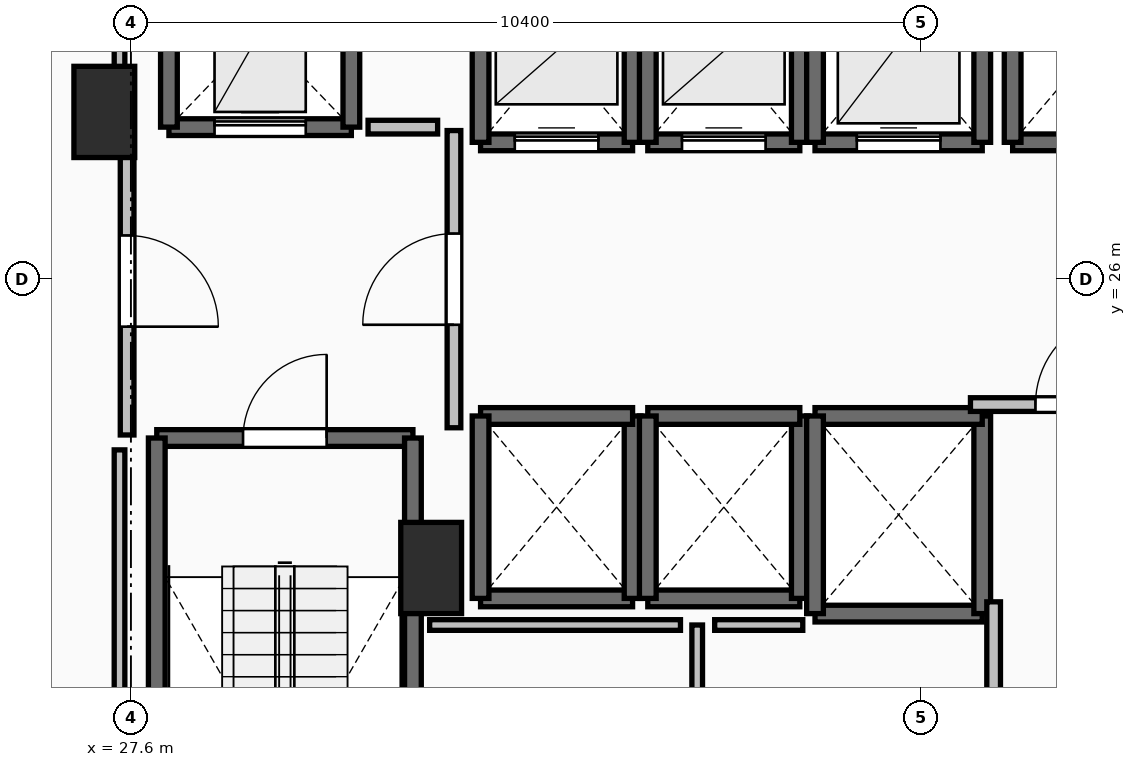
"""IFC4 building model, lengths in metres.
Left out: names, types, materials, properties, quantities, classifications, styles, units other than length and angle.
Written with IfcOpenShell. Run it as: python <this file> out.ifc"""

import sys

from ifc_helpers import new_model, si_unit, direction, frame, frame_2d, origin, origin_2d, place, context, subcontext, project, spatial, rectangle, extrude, element, fill, save


model = new_model("IFC4")
c1 = context("Model", 3, precision=1e-05, world=origin(), true_north=direction((0.0, 1.0)))
c2 = subcontext(c1, "Body", "Model", "MODEL_VIEW")
j1 = project(units=[si_unit("LENGTHUNIT", "METRE"), si_unit("PLANEANGLEUNIT", "RADIAN")], contexts=[c1])
p1 = place(None, origin())
s1 = spatial("IfcSite", under=j1, at=p1, CompositionType="ELEMENT")
p2 = place(p1, origin())
s2 = spatial("IfcBuilding", under=s1, at=p2, CompositionType="ELEMENT")
p3 = place(p2, frame((0.0, 0.0, 85.8)))
s3 = spatial("IfcBuildingStorey", under=s2, at=p3, CompositionType="ELEMENT", Elevation=85.8)
for number, where, z_axis, x_axis in (
    (1, (27.25, 28.2, 0.0), (0.0, 0.0, 1.0), (1.0, 0.0, 0.0)),
    (2, (31.55, 22.2, 0.0), (0.0, 0.0, 1.0), (1.0, 0.0, 0.0)),
):
    element("IfcColumn", number, at=place(p3, frame(where, z_axis=z_axis, x_axis=x_axis)), inside=s3, PredefinedType="PILASTER", context=c2, shape_type="SweptSolid", body=[
        extrude(rectangle(XDim=0.8, YDim=1.2, at=origin_2d()), origin(), (0.0, 0.0, 1.0), 3.5),
    ])
p4 = place(p3, frame((27.94, 23.91, 0.0), z_axis=(0.0, 0.0, 1.0), x_axis=(1.0, 0.0, 0.0)))
e3 = element("IfcWall", 3, at=p4, inside=s3, PredefinedType="SOLIDWALL", context=c2, shape_type="SweptSolid", body=[
    extrude(rectangle(XDim=3.37, YDim=0.22, at=frame_2d((1.685, 0.0))), origin(), (0.0, 0.0, 1.0), 3.24),
])
p5 = place(p4, frame((1.135, 0.0, 0.0)))
e4 = element("IfcOpeningElement", 4, at=p5, cuts=e3, PredefinedType="OPENING", context=c2, shape_type="SweptSolid", body=[
    extrude(rectangle(XDim=1.1, YDim=2.15, at=frame_2d((0.55, 1.075))), frame((0.0, 0.125, 0.0), z_axis=(0.0, -1.0, 0.0), x_axis=(1.0, 0.0, 0.0)), (0.0, 0.0, 1.0), 0.25),
])
for number, where, z_axis, x_axis in (
    (5, (31.31, 23.91, 0.0), (0.0, 0.0, 1.0), (0.0, -1.0, 0.0)),
    (6, (27.94, 16.49, 0.0), (0.0, 0.0, 1.0), (0.0, 1.0, 0.0)),
):
    element("IfcWall", number, at=place(p3, frame(where, z_axis=z_axis, x_axis=x_axis)), inside=s3, PredefinedType="SOLIDWALL", context=c2, shape_type="SweptSolid", body=[
        extrude(rectangle(XDim=7.42, YDim=0.22, at=frame_2d((3.71, 0.0))), origin(), (0.0, 0.0, 1.0), 3.24),
    ])
p6 = place(p3, frame((32.2, 27.8, 0.0), z_axis=(0.0, 0.0, 1.0), x_axis=(1.0, 0.0, 0.0)))
e7 = element("IfcWall", 7, at=p6, inside=s3, PredefinedType="SOLIDWALL", context=c2, shape_type="SweptSolid", body=[
    extrude(rectangle(XDim=2.0, YDim=0.22, at=frame_2d((1.0, 0.0))), origin(), (0.0, 0.0, 1.0), 3.24),
])
p7 = place(p6, frame((0.45, 0.0, 0.0)))
e8 = element("IfcOpeningElement", 8, at=p7, cuts=e7, PredefinedType="OPENING", context=c2, shape_type="SweptSolid", body=[
    extrude(rectangle(XDim=1.1, YDim=2.2, at=frame_2d((0.55, 1.1))), frame((0.0, 0.125, 0.0), z_axis=(0.0, -1.0, 0.0), x_axis=(1.0, 0.0, 0.0)), (0.0, 0.0, 1.0), 0.25),
])
for number, where, z_axis, x_axis in (
    (9, (34.2, 27.8, 0.0), (0.0, 0.0, 1.0), (0.0, 1.0, 0.0)),
    (10, (32.2, 30.2, 0.0), (0.0, 0.0, 1.0), (0.0, -1.0, 0.0)),
):
    element("IfcWall", number, at=place(p3, frame(where, z_axis=z_axis, x_axis=x_axis)), inside=s3, PredefinedType="SOLIDWALL", context=c2, shape_type="SweptSolid", body=[
        extrude(rectangle(XDim=2.4, YDim=0.22, at=frame_2d((1.2, 0.0))), origin(), (0.0, 0.0, 1.0), 3.24),
    ])
p8 = place(p3, frame((34.4, 27.8, 0.0), z_axis=(0.0, 0.0, 1.0), x_axis=(1.0, 0.0, 0.0)))
e11 = element("IfcWall", 11, at=p8, inside=s3, PredefinedType="SOLIDWALL", context=c2, shape_type="SweptSolid", body=[
    extrude(rectangle(XDim=2.0, YDim=0.22, at=frame_2d((1.0, 0.0))), origin(), (0.0, 0.0, 1.0), 3.24),
])
p9 = place(p8, frame((0.45, 0.0, 0.0)))
e12 = element("IfcOpeningElement", 12, at=p9, cuts=e11, PredefinedType="OPENING", context=c2, shape_type="SweptSolid", body=[
    extrude(rectangle(XDim=1.1, YDim=2.2, at=frame_2d((0.55, 1.1))), frame((0.0, 0.125, 0.0), z_axis=(0.0, -1.0, 0.0), x_axis=(1.0, 0.0, 0.0)), (0.0, 0.0, 1.0), 0.25),
])
for number, where, z_axis, x_axis in (
    (13, (36.4, 27.8, 0.0), (0.0, 0.0, 1.0), (0.0, 1.0, 0.0)),
    (14, (34.4, 30.2, 0.0), (0.0, 0.0, 1.0), (0.0, -1.0, 0.0)),
):
    element("IfcWall", number, at=place(p3, frame(where, z_axis=z_axis, x_axis=x_axis)), inside=s3, PredefinedType="SOLIDWALL", context=c2, shape_type="SweptSolid", body=[
        extrude(rectangle(XDim=2.4, YDim=0.22, at=frame_2d((1.2, 0.0))), origin(), (0.0, 0.0, 1.0), 3.24),
    ])
p10 = place(p3, frame((36.6, 27.8, 0.0), z_axis=(0.0, 0.0, 1.0), x_axis=(1.0, 0.0, 0.0)))
e15 = element("IfcWall", 15, at=p10, inside=s3, PredefinedType="SOLIDWALL", context=c2, shape_type="SweptSolid", body=[
    extrude(rectangle(XDim=2.2, YDim=0.22, at=frame_2d((1.1, 0.0))), origin(), (0.0, 0.0, 1.0), 3.24),
])
p11 = place(p10, frame((0.55, 0.0, 0.0)))
e16 = element("IfcOpeningElement", 16, at=p11, cuts=e15, PredefinedType="OPENING", context=c2, shape_type="SweptSolid", body=[
    extrude(rectangle(XDim=1.1, YDim=2.2, at=frame_2d((0.55, 1.1))), frame((0.0, 0.125, 0.0), z_axis=(0.0, -1.0, 0.0), x_axis=(1.0, 0.0, 0.0)), (0.0, 0.0, 1.0), 0.25),
])
for number, where, z_axis, x_axis in (
    (17, (38.8, 27.8, 0.0), (0.0, 0.0, 1.0), (0.0, 1.0, 0.0)),
    (18, (36.6, 30.4, 0.0), (0.0, 0.0, 1.0), (0.0, -1.0, 0.0)),
):
    element("IfcWall", number, at=place(p3, frame(where, z_axis=z_axis, x_axis=x_axis)), inside=s3, PredefinedType="SOLIDWALL", context=c2, shape_type="SweptSolid", body=[
        extrude(rectangle(XDim=2.6, YDim=0.22, at=frame_2d((1.3, 0.0))), origin(), (0.0, 0.0, 1.0), 3.24),
    ])
p12 = place(p3, frame((32.2, 21.8, 0.0), z_axis=(0.0, 0.0, 1.0), x_axis=(1.0, 0.0, 0.0)))
e19 = element("IfcWall", 19, at=p12, inside=s3, PredefinedType="SOLIDWALL", context=c2, shape_type="SweptSolid", body=[
    extrude(rectangle(XDim=2.0, YDim=0.22, at=frame_2d((1.0, 0.0))), origin(), (0.0, 0.0, 1.0), 3.24),
])
p13 = place(p3, frame((34.2, 21.8, 0.0), z_axis=(0.0, 0.0, 1.0), x_axis=(0.0, 1.0, 0.0)))
e20 = element("IfcWall", 20, at=p13, inside=s3, PredefinedType="SOLIDWALL", context=c2, shape_type="SweptSolid", body=[
    extrude(rectangle(XDim=2.4, YDim=0.22, at=frame_2d((1.2, 0.0))), origin(), (0.0, 0.0, 1.0), 3.24),
])
p14 = place(p3, frame((34.2, 24.2, 0.0), z_axis=(0.0, 0.0, 1.0), x_axis=(-1.0, 0.0, 0.0)))
e21 = element("IfcWall", 21, at=p14, inside=s3, PredefinedType="SOLIDWALL", context=c2, shape_type="SweptSolid", body=[
    extrude(rectangle(XDim=2.0, YDim=0.22, at=frame_2d((1.0, 0.0))), origin(), (0.0, 0.0, 1.0), 3.24),
])
p15 = place(p3, frame((32.2, 24.2, 0.0), z_axis=(0.0, 0.0, 1.0), x_axis=(0.0, -1.0, 0.0)))
e22 = element("IfcWall", 22, at=p15, inside=s3, PredefinedType="SOLIDWALL", context=c2, shape_type="SweptSolid", body=[
    extrude(rectangle(XDim=2.4, YDim=0.22, at=frame_2d((1.2, 0.0))), origin(), (0.0, 0.0, 1.0), 3.24),
])
p16 = place(p3, frame((34.4, 21.8, 0.0), z_axis=(0.0, 0.0, 1.0), x_axis=(1.0, 0.0, 0.0)))
e23 = element("IfcWall", 23, at=p16, inside=s3, PredefinedType="SOLIDWALL", context=c2, shape_type="SweptSolid", body=[
    extrude(rectangle(XDim=2.0, YDim=0.22, at=frame_2d((1.0, 0.0))), origin(), (0.0, 0.0, 1.0), 3.24),
])
p17 = place(p3, frame((36.4, 21.8, 0.0), z_axis=(0.0, 0.0, 1.0), x_axis=(0.0, 1.0, 0.0)))
e24 = element("IfcWall", 24, at=p17, inside=s3, PredefinedType="SOLIDWALL", context=c2, shape_type="SweptSolid", body=[
    extrude(rectangle(XDim=2.4, YDim=0.22, at=frame_2d((1.2, 0.0))), origin(), (0.0, 0.0, 1.0), 3.24),
])
p18 = place(p3, frame((36.4, 24.2, 0.0), z_axis=(0.0, 0.0, 1.0), x_axis=(-1.0, 0.0, 0.0)))
e25 = element("IfcWall", 25, at=p18, inside=s3, PredefinedType="SOLIDWALL", context=c2, shape_type="SweptSolid", body=[
    extrude(rectangle(XDim=2.0, YDim=0.22, at=frame_2d((1.0, 0.0))), origin(), (0.0, 0.0, 1.0), 3.24),
])
p19 = place(p3, frame((34.4, 24.2, 0.0), z_axis=(0.0, 0.0, 1.0), x_axis=(0.0, -1.0, 0.0)))
e26 = element("IfcWall", 26, at=p19, inside=s3, PredefinedType="SOLIDWALL", context=c2, shape_type="SweptSolid", body=[
    extrude(rectangle(XDim=2.4, YDim=0.22, at=frame_2d((1.2, 0.0))), origin(), (0.0, 0.0, 1.0), 3.24),
])
p20 = place(p3, frame((36.6, 21.6, 0.0), z_axis=(0.0, 0.0, 1.0), x_axis=(1.0, 0.0, 0.0)))
e27 = element("IfcWall", 27, at=p20, inside=s3, PredefinedType="SOLIDWALL", context=c2, shape_type="SweptSolid", body=[
    extrude(rectangle(XDim=2.2, YDim=0.22, at=frame_2d((1.1, 0.0))), origin(), (0.0, 0.0, 1.0), 3.24),
])
p21 = place(p3, frame((38.8, 21.6, 0.0), z_axis=(0.0, 0.0, 1.0), x_axis=(0.0, 1.0, 0.0)))
e28 = element("IfcWall", 28, at=p21, inside=s3, PredefinedType="SOLIDWALL", context=c2, shape_type="SweptSolid", body=[
    extrude(rectangle(XDim=2.6, YDim=0.22, at=frame_2d((1.3, 0.0))), origin(), (0.0, 0.0, 1.0), 3.24),
])
p22 = place(p3, frame((38.8, 24.2, 0.0), z_axis=(0.0, 0.0, 1.0), x_axis=(-1.0, 0.0, 0.0)))
e29 = element("IfcWall", 29, at=p22, inside=s3, PredefinedType="SOLIDWALL", context=c2, shape_type="SweptSolid", body=[
    extrude(rectangle(XDim=2.2, YDim=0.22, at=frame_2d((1.1, 0.0))), origin(), (0.0, 0.0, 1.0), 3.24),
])
p23 = place(p3, frame((36.6, 24.2, 0.0), z_axis=(0.0, 0.0, 1.0), x_axis=(0.0, -1.0, 0.0)))
e30 = element("IfcWall", 30, at=p23, inside=s3, PredefinedType="SOLIDWALL", context=c2, shape_type="SweptSolid", body=[
    extrude(rectangle(XDim=2.6, YDim=0.22, at=frame_2d((1.3, 0.0))), origin(), (0.0, 0.0, 1.0), 3.24),
])
p24 = place(p3, frame((39.2, 27.8, 0.0), z_axis=(0.0, 0.0, 1.0), x_axis=(1.0, 0.0, 0.0)))
e31 = element("IfcWall", 31, at=p24, inside=s3, PredefinedType="SOLIDWALL", context=c2, shape_type="SweptSolid", body=[
    extrude(rectangle(XDim=2.2, YDim=0.22, at=frame_2d((1.1, 0.0))), origin(), (0.0, 0.0, 1.0), 3.24),
])
p25 = place(p3, frame((39.2, 30.4, 0.0), z_axis=(0.0, 0.0, 1.0), x_axis=(0.0, -1.0, 0.0)))
e32 = element("IfcWall", 32, at=p25, inside=s3, PredefinedType="SOLIDWALL", context=c2, shape_type="SweptSolid", body=[
    extrude(rectangle(XDim=2.6, YDim=0.22, at=frame_2d((1.3, 0.0))), origin(), (0.0, 0.0, 1.0), 3.24),
])
p26 = place(p3, frame((28.1, 28.0, 0.0), z_axis=(0.0, 0.0, 1.0), x_axis=(1.0, 0.0, 0.0)))
e33 = element("IfcWall", 33, at=p26, inside=s3, PredefinedType="SHEAR", context=c2, shape_type="SweptSolid", body=[
    extrude(rectangle(XDim=2.4, YDim=0.22, at=frame_2d((1.2, 0.0))), origin(), (0.0, 0.0, 1.0), 3.24),
])
p27 = place(p26, frame((0.6, 0.0, 0.0)))
e34 = element("IfcOpeningElement", 34, at=p27, cuts=e33, PredefinedType="OPENING", context=c2, shape_type="SweptSolid", body=[
    extrude(rectangle(XDim=1.2, YDim=2.2, at=frame_2d((0.6, 1.1))), frame((0.0, 0.125, 0.0), z_axis=(0.0, -1.0, 0.0), x_axis=(1.0, 0.0, 0.0)), (0.0, 0.0, 1.0), 0.25),
])
for number, where, z_axis, x_axis in (
    (35, (30.5, 28.0, 0.0), (0.0, 0.0, 1.0), (0.0, 1.0, 0.0)),
    (36, (28.1, 30.5, 0.0), (0.0, 0.0, 1.0), (0.0, -1.0, 0.0)),
):
    element("IfcWall", number, at=place(p3, frame(where, z_axis=z_axis, x_axis=x_axis)), inside=s3, PredefinedType="SHEAR", context=c2, shape_type="SweptSolid", body=[
        extrude(rectangle(XDim=2.5, YDim=0.22, at=frame_2d((1.25, 0.0))), origin(), (0.0, 0.0, 1.0), 3.24),
    ])
p28 = place(p3, frame((31.85, 24.045, 0.0), z_axis=(0.0, 0.0, 1.0), x_axis=(0.0, 1.0, 0.0)))
e37 = element("IfcWall", 37, at=p28, inside=s3, PredefinedType="PARTITIONING", context=c2, shape_type="SweptSolid", body=[
    extrude(rectangle(XDim=3.91, YDim=0.18, at=frame_2d((1.955, 0.0))), origin(), (0.0, 0.0, 1.0), 3.24),
])
p29 = place(p28, frame((1.355, 0.0, 0.0)))
e38 = element("IfcOpeningElement", 38, at=p29, cuts=e37, PredefinedType="OPENING", context=c2, shape_type="SweptSolid", body=[
    extrude(rectangle(XDim=1.2, YDim=2.15, at=frame_2d((0.6, 1.075))), frame((0.0, 0.105, 0.0), z_axis=(0.0, -1.0, 0.0), x_axis=(1.0, 0.0, 0.0)), (0.0, 0.0, 1.0), 0.21),
])
p30 = place(p3, frame((27.55, 28.0, 0.0), z_axis=(0.0, 0.0, 1.0), x_axis=(0.0, -1.0, 0.0)))
e39 = element("IfcWall", 39, at=p30, inside=s3, PredefinedType="PARTITIONING", context=c2, shape_type="SweptSolid", body=[
    extrude(rectangle(XDim=4.05, YDim=0.18, at=frame_2d((2.025, 0.0))), origin(), (0.0, 0.0, 1.0), 3.24),
])
p31 = place(p30, frame((1.425, 0.0, 0.0)))
e40 = element("IfcOpeningElement", 40, at=p31, cuts=e39, PredefinedType="OPENING", context=c2, shape_type="SweptSolid", body=[
    extrude(rectangle(XDim=1.2, YDim=2.15, at=frame_2d((0.6, 1.075))), frame((0.0, 0.105, 0.0), z_axis=(0.0, -1.0, 0.0), x_axis=(1.0, 0.0, 0.0)), (0.0, 0.0, 1.0), 0.21),
])
p32 = place(p3, frame((38.645, 24.35, 0.0), z_axis=(0.0, 0.0, 1.0), x_axis=(1.0, 0.0, 0.0)))
e41 = element("IfcWall", 41, at=p32, inside=s3, PredefinedType="PARTITIONING", context=c2, shape_type="SweptSolid", body=[
    extrude(rectangle(XDim=2.91, YDim=0.18, at=frame_2d((1.455, 0.0))), origin(), (0.0, 0.0, 1.0), 3.24),
])
p33 = place(p32, frame((0.855, 0.0, 0.0)))
e42 = element("IfcOpeningElement", 42, at=p33, cuts=e41, PredefinedType="OPENING", context=c2, shape_type="SweptSolid", body=[
    extrude(rectangle(XDim=1.2, YDim=2.15, at=frame_2d((0.6, 1.075))), frame((0.0, 0.105, 0.0), z_axis=(0.0, -1.0, 0.0), x_axis=(1.0, 0.0, 0.0)), (0.0, 0.0, 1.0), 0.21),
])
p34 = place(p3, frame((38.95, 21.755, 0.0), z_axis=(0.0, 0.0, 1.0), x_axis=(0.0, -1.0, 0.0)))
e43 = element("IfcWall", 43, at=p34, inside=s3, PredefinedType="PARTITIONING", context=c2, shape_type="SweptSolid", body=[
    extrude(rectangle(XDim=5.435, YDim=0.18, at=frame_2d((2.717, 0.0))), origin(), (0.0, 0.0, 1.0), 3.24),
])
p35 = place(p34, frame((2.292, 0.0, 0.0)))
e44 = element("IfcOpeningElement", 44, at=p35, cuts=e43, PredefinedType="OPENING", context=c2, shape_type="SweptSolid", body=[
    extrude(rectangle(XDim=0.85, YDim=2.1, at=frame_2d((0.425, 1.05))), frame((0.0, 0.105, 0.0), z_axis=(0.0, -1.0, 0.0), x_axis=(1.0, 0.0, 0.0)), (0.0, 0.0, 1.0), 0.21),
])
p36 = place(p3, frame((35.05, 16.32, 0.0), z_axis=(0.0, 0.0, 1.0), x_axis=(0.0, 1.0, 0.0)))
e45 = element("IfcWall", 45, at=p36, inside=s3, PredefinedType="PARTITIONING", context=c2, shape_type="SweptSolid", body=[
    extrude(rectangle(XDim=5.13, YDim=0.14, at=frame_2d((2.565, 0.0))), origin(), (0.0, 0.0, 1.0), 3.24),
])
p37 = place(p3, frame((31.635, 28.0, 0.0), z_axis=(0.0, 0.0, 1.0), x_axis=(-1.0, 0.0, 0.0)))
e46 = element("IfcWall", 46, at=p37, inside=s3, PredefinedType="PARTITIONING", context=c2, shape_type="SweptSolid", body=[
    extrude(rectangle(XDim=0.915, YDim=0.18, at=frame_2d((0.458, 0.0))), origin(), (0.0, 0.0, 1.0), 3.24),
])
p38 = place(p3, frame((34.83, 21.45, 0.0), z_axis=(0.0, 0.0, 1.0), x_axis=(-1.0, 0.0, 0.0)))
e47 = element("IfcWall", 47, at=p38, inside=s3, PredefinedType="PARTITIONING", context=c2, shape_type="SweptSolid", body=[
    extrude(rectangle(XDim=3.3, YDim=0.14, at=frame_2d((1.65, 0.0))), origin(), (0.0, 0.0, 1.0), 3.24),
])
p39 = place(p3, frame((36.439, 21.45, 0.0), z_axis=(0.0, 0.0, 1.0), x_axis=(-1.0, 0.0, 0.0)))
e48 = element("IfcWall", 48, at=p39, inside=s3, PredefinedType="PARTITIONING", context=c2, shape_type="SweptSolid", body=[
    extrude(rectangle(XDim=1.159, YDim=0.14, at=frame_2d((0.58, 0.0))), origin(), (0.0, 0.0, 1.0), 3.24),
])
p40 = place(p3, frame((27.45, 16.24, 0.0), z_axis=(0.0, 0.0, 1.0), x_axis=(0.0, 1.0, 0.0)))
e49 = element("IfcWall", 49, at=p40, inside=s3, PredefinedType="PARTITIONING", context=c2, shape_type="SweptSolid", body=[
    extrude(rectangle(XDim=7.514, YDim=0.14, at=frame_2d((3.757, 0.0))), origin(), (0.0, 0.0, 1.0), 2.432),
])
p41 = place(p3, frame((27.45, 28.196, 0.0), z_axis=(0.0, 0.0, 1.0), x_axis=(0.0, 1.0, 0.0)))
e50 = element("IfcWall", 50, at=p41, inside=s3, PredefinedType="PARTITIONING", context=c2, shape_type="SweptSolid", body=[
    extrude(rectangle(XDim=5.254, YDim=0.14, at=frame_2d((2.627, 0.0))), origin(), (0.0, 0.0, 1.0), 2.432),
])
p42 = place(p5, origin())
e51 = element("IfcDoor", 51, at=p42, inside=s3, OperationType="SINGLE_SWING_RIGHT", PredefinedType="DOOR", context=c2, shape_type="SweptSolid", body=[
    extrude(rectangle(XDim=1.1, YDim=2.15, at=frame_2d((0.55, 1.075))), frame((0.0, 0.025, 0.0), z_axis=(0.0, -1.0, 0.0), x_axis=(1.0, 0.0, 0.0)), (0.0, 0.0, 1.0), 0.05),
])
fill(e4, e51)
p43 = place(p7, origin())
e52 = element("IfcDoor", 52, at=p43, inside=s3, OperationType="SLIDING_TO_LEFT", PredefinedType="DOOR", context=c2, shape_type="SweptSolid", body=[
    extrude(rectangle(XDim=1.1, YDim=2.2, at=frame_2d((0.55, 1.1))), frame((0.0, 0.025, 0.0), z_axis=(0.0, -1.0, 0.0), x_axis=(1.0, 0.0, 0.0)), (0.0, 0.0, 1.0), 0.05),
])
fill(e8, e52)
p44 = place(p9, origin())
e53 = element("IfcDoor", 53, at=p44, inside=s3, OperationType="SLIDING_TO_LEFT", PredefinedType="DOOR", context=c2, shape_type="SweptSolid", body=[
    extrude(rectangle(XDim=1.1, YDim=2.2, at=frame_2d((0.55, 1.1))), frame((0.0, 0.025, 0.0), z_axis=(0.0, -1.0, 0.0), x_axis=(1.0, 0.0, 0.0)), (0.0, 0.0, 1.0), 0.05),
])
fill(e12, e53)
p45 = place(p11, origin())
e54 = element("IfcDoor", 54, at=p45, inside=s3, OperationType="SLIDING_TO_LEFT", PredefinedType="DOOR", context=c2, shape_type="SweptSolid", body=[
    extrude(rectangle(XDim=1.1, YDim=2.2, at=frame_2d((0.55, 1.1))), frame((0.0, 0.025, 0.0), z_axis=(0.0, -1.0, 0.0), x_axis=(1.0, 0.0, 0.0)), (0.0, 0.0, 1.0), 0.05),
])
fill(e16, e54)
p46 = place(p27, origin())
e55 = element("IfcDoor", 55, at=p46, inside=s3, OperationType="SLIDING_TO_LEFT", PredefinedType="DOOR", context=c2, shape_type="SweptSolid", body=[
    extrude(rectangle(XDim=1.2, YDim=2.2, at=frame_2d((0.6, 1.1))), frame((0.0, 0.025, 0.0), z_axis=(0.0, -1.0, 0.0), x_axis=(1.0, 0.0, 0.0)), (0.0, 0.0, 1.0), 0.05),
])
fill(e34, e55)
p47 = place(p29, origin())
e56 = element("IfcDoor", 56, at=p47, inside=s3, OperationType="SINGLE_SWING_LEFT", PredefinedType="DOOR", context=c2, shape_type="SweptSolid", body=[
    extrude(rectangle(XDim=1.2, YDim=2.15, at=frame_2d((0.6, 1.075))), frame((0.0, 0.025, 0.0), z_axis=(0.0, -1.0, 0.0), x_axis=(1.0, 0.0, 0.0)), (0.0, 0.0, 1.0), 0.05),
])
fill(e38, e56)
p48 = place(p31, origin())
e57 = element("IfcDoor", 57, at=p48, inside=s3, OperationType="SINGLE_SWING_RIGHT", PredefinedType="DOOR", context=c2, shape_type="SweptSolid", body=[
    extrude(rectangle(XDim=1.2, YDim=2.15, at=frame_2d((0.6, 1.075))), frame((0.0, 0.025, 0.0), z_axis=(0.0, -1.0, 0.0), x_axis=(1.0, 0.0, 0.0)), (0.0, 0.0, 1.0), 0.05),
])
fill(e40, e57)
p49 = place(p33, origin())
e58 = element("IfcDoor", 58, at=p49, inside=s3, OperationType="SINGLE_SWING_RIGHT", PredefinedType="DOOR", context=c2, shape_type="SweptSolid", body=[
    extrude(rectangle(XDim=1.2, YDim=2.15, at=frame_2d((0.6, 1.075))), frame((0.0, 0.025, 0.0), z_axis=(0.0, -1.0, 0.0), x_axis=(1.0, 0.0, 0.0)), (0.0, 0.0, 1.0), 0.05),
])
fill(e42, e58)
save(model, sys.argv[1])
